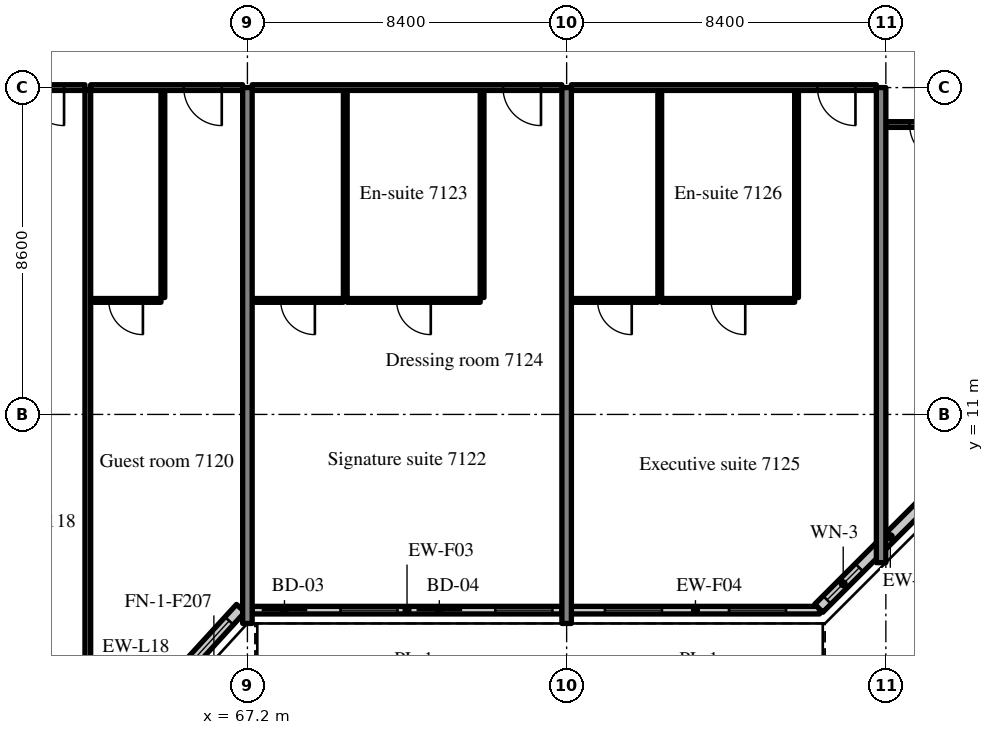
"""IFC4 building model, lengths in metres.
Left out: names, types, materials, properties, quantities, classifications, styles, units other than length and angle.
Written with IfcOpenShell. Run it as: python <this file> out.ifc"""

import sys

from ifc_helpers import new_model, si_unit, direction, frame, frame_2d, origin, place, context, subcontext, project, spatial, rectangle, extrude, source, transform, mapped, element, fill, save


model = new_model("IFC4")
c1 = context("Model", 3, precision=1e-05, world=origin(), true_north=direction((0.0, 1.0)))
c2 = subcontext(c1, "Body", "Model", "MODEL_VIEW")
j1 = project(units=[si_unit("LENGTHUNIT", "METRE"), si_unit("PLANEANGLEUNIT", "RADIAN")], contexts=[c1])
p1 = place(None, origin())
s1 = spatial("IfcSite", under=j1, at=p1, CompositionType="ELEMENT")
p2 = place(p1, origin())
s2 = spatial("IfcBuilding", under=s1, at=p2, CompositionType="ELEMENT")
p3 = place(p2, frame((0.0, 0.0, 297.7)))
s3 = spatial("IfcBuildingStorey", under=s2, at=p3, CompositionType="ELEMENT", Elevation=297.7)
m1 = source(origin(), c2, "Body", "SweptSolid", [
    extrude(rectangle(XDim=14.1, YDim=0.25, at=frame_2d((7.05, 0.0))), origin(), (0.0, 0.0, 1.0), 3.72),
])
for number, where, z_axis, x_axis in (
    (1, (67.2, 5.5, 0.0), (0.0, 0.0, 1.0), (0.0, 1.0, 0.0)),
    (2, (75.6, 5.5, 0.0), (0.0, 0.0, 1.0), (0.0, 1.0, 0.0)),
):
    element("IfcWall", number, at=place(p3, frame(where, z_axis=z_axis, x_axis=x_axis)), inside=s3, PredefinedType="SHEAR", context=c2, shape_type="MappedRepresentation", body=[
        mapped(m1, transform((0.0, 0.0, 0.0), scale=1.0)),
    ])
m2 = source(origin(), c2, "Body", "SweptSolid", [
    extrude(rectangle(XDim=12.5, YDim=0.25, at=frame_2d((6.25, 0.0))), origin(), (0.0, 0.0, 1.0), 3.72),
])
p4 = place(p3, frame((83.875, 7.1, 0.0), z_axis=(0.0, 0.0, 1.0), x_axis=(0.0, 1.0, 0.0)))
e3 = element("IfcWall", 3, at=p4, inside=s3, PredefinedType="SHEAR", context=c2, shape_type="MappedRepresentation", body=[
    mapped(m2, transform((0.0, 0.0, 0.0), scale=1.0)),
])
m3 = source(origin(), c2, "Body", "SweptSolid", [
    extrude(rectangle(XDim=2.398, YDim=0.3, at=frame_2d((1.199, 0.0))), origin(), (0.0, 0.0, 1.0), 3.72),
])
p5 = place(p3, frame((65.404, 4.131, 0.0), z_axis=(0.0, 0.0, 1.0), x_axis=(0.675374189419, 0.737475222815, 0.0)))
e4 = element("IfcWall", 4, at=p5, inside=s3, PredefinedType="SOLIDWALL", context=c2, shape_type="MappedRepresentation", body=[
    mapped(m3, transform((0.0, 0.0, 0.0), scale=1.0)),
])
m4 = source(origin(), c2, "Body", "SweptSolid", [
    extrude(rectangle(XDim=1.5, YDim=2.0, at=frame_2d((0.75, 1.0))), frame((0.0, 0.16, 0.0), z_axis=(0.0, -1.0, 0.0), x_axis=(1.0, 0.0, 0.0)), (0.0, 0.0, 1.0), 0.32),
])
p6 = place(p5, frame((0.449, 0.0, 0.9)))
e5 = element("IfcOpeningElement", 5, at=p6, cuts=e4, PredefinedType="OPENING", context=c2, shape_type="MappedRepresentation", body=[
    mapped(m4, transform((0.0, 0.0, 0.0), scale=1.0)),
])
m5 = source(origin(), c2, "Body", "SweptSolid", [
    extrude(rectangle(XDim=8.15, YDim=0.2, at=frame_2d((4.075, 0.0))), origin(), (0.0, 0.0, 1.0), 3.17),
])
p7 = place(p3, frame((67.325, 5.85, 0.0), z_axis=(0.0, 0.0, 1.0), x_axis=(1.0, 0.0, 0.0)))
e6 = element("IfcWall", 6, at=p7, inside=s3, PredefinedType="SOLIDWALL", context=c2, shape_type="MappedRepresentation", body=[
    mapped(m5, transform((0.0, 0.0, 0.0), scale=1.0)),
])
m6 = source(origin(), c2, "Body", "SweptSolid", [
    extrude(rectangle(XDim=1.2, YDim=2.4, at=frame_2d((0.6, 1.2))), frame((0.0, 0.11, 0.0), z_axis=(0.0, -1.0, 0.0), x_axis=(1.0, 0.0, 0.0)), (0.0, 0.0, 1.0), 0.22),
])
p8 = place(p7, frame((0.25, 0.0, 0.0)))
e7 = element("IfcOpeningElement", 7, at=p8, cuts=e6, PredefinedType="OPENING", context=c2, shape_type="MappedRepresentation", body=[
    mapped(m6, transform((0.0, 0.0, 0.0), scale=1.0)),
])
m7 = source(origin(), c2, "Body", "SweptSolid", [
    extrude(rectangle(XDim=1.5, YDim=1.5, at=frame_2d((0.75, 0.75))), frame((0.0, 0.11, 0.0), z_axis=(0.0, -1.0, 0.0), x_axis=(1.0, 0.0, 0.0)), (0.0, 0.0, 1.0), 0.22),
])
p9 = place(p7, frame((2.325, 0.0, 0.9)))
e8 = element("IfcOpeningElement", 8, at=p9, cuts=e6, PredefinedType="OPENING", context=c2, shape_type="MappedRepresentation", body=[
    mapped(m7, transform((0.0, 0.0, 0.0), scale=1.0)),
])
p10 = place(p7, frame((4.325, 0.0, 0.0)))
e9 = element("IfcOpeningElement", 9, at=p10, cuts=e6, PredefinedType="OPENING", context=c2, shape_type="MappedRepresentation", body=[
    mapped(m6, transform((0.0, 0.0, 0.0), scale=1.0)),
])
p11 = place(p7, frame((6.4, 0.0, 0.9)))
e10 = element("IfcOpeningElement", 10, at=p11, cuts=e6, PredefinedType="OPENING", context=c2, shape_type="MappedRepresentation", body=[
    mapped(m7, transform((0.0, 0.0, 0.0), scale=1.0)),
])
m8 = source(origin(), c2, "Body", "SweptSolid", [
    extrude(rectangle(XDim=6.53, YDim=0.2, at=frame_2d((3.265, 0.0))), origin(), (0.0, 0.0, 1.0), 3.17),
])
p12 = place(p3, frame((75.725, 5.85, 0.0), z_axis=(0.0, 0.0, 1.0), x_axis=(1.0, 0.0, 0.0)))
e11 = element("IfcWall", 11, at=p12, inside=s3, PredefinedType="SOLIDWALL", context=c2, shape_type="MappedRepresentation", body=[
    mapped(m8, transform((0.0, 0.0, 0.0), scale=1.0)),
])
p13 = place(p12, frame((0.883, 0.0, 0.9)))
e12 = element("IfcOpeningElement", 12, at=p13, cuts=e11, PredefinedType="OPENING", context=c2, shape_type="MappedRepresentation", body=[
    mapped(m7, transform((0.0, 0.0, 0.0), scale=1.0)),
])
p14 = place(p12, frame((4.147, 0.0, 0.9)))
e13 = element("IfcOpeningElement", 13, at=p14, cuts=e11, PredefinedType="OPENING", context=c2, shape_type="MappedRepresentation", body=[
    mapped(m7, transform((0.0, 0.0, 0.0), scale=1.0)),
])
m9 = source(origin(), c2, "Body", "SweptSolid", [
    extrude(rectangle(XDim=5.326, YDim=0.3, at=frame_2d((2.663, 0.0))), origin(), (0.0, 0.0, 1.0), 3.72),
])
p15 = place(p3, frame((82.234, 5.9, 0.0), z_axis=(0.0, 0.0, 1.0), x_axis=(0.707083859269, 0.707129702361, 0.0)))
e14 = element("IfcWall", 14, at=p15, inside=s3, PredefinedType="SOLIDWALL", context=c2, shape_type="MappedRepresentation", body=[
    mapped(m9, transform((0.0, 0.0, 0.0), scale=1.0)),
])
m10 = source(origin(), c2, "Body", "SweptSolid", [
    extrude(rectangle(XDim=1.2, YDim=1.5, at=frame_2d((0.6, 0.75))), frame((0.0, 0.16, 0.0), z_axis=(0.0, -1.0, 0.0), x_axis=(1.0, 0.0, 0.0)), (0.0, 0.0, 1.0), 0.32),
])
p16 = place(p15, frame((0.31, 0.0, 0.9)))
e15 = element("IfcOpeningElement", 15, at=p16, cuts=e14, PredefinedType="OPENING", context=c2, shape_type="MappedRepresentation", body=[
    mapped(m10, transform((0.0, 0.0, 0.0), scale=1.0)),
])
m11 = source(origin(), c2, "Body", "SweptSolid", [
    extrude(rectangle(XDim=4.0, YDim=0.15, at=frame_2d((2.0, 0.0))), origin(), (0.0, 0.0, 1.0), 3.02),
])
p17 = place(p3, frame((58.925, 19.6, 0.0), z_axis=(0.0, 0.0, 1.0), x_axis=(1.0, 0.0, 0.0)))
e16 = element("IfcWall", 16, at=p17, inside=s3, PredefinedType="PARTITIONING", context=c2, shape_type="MappedRepresentation", body=[
    mapped(m11, transform((0.0, 0.0, 0.0), scale=1.0)),
])
m12 = source(origin(), c2, "Body", "SweptSolid", [
    extrude(rectangle(XDim=1.0, YDim=2.1, at=frame_2d((0.5, 1.05))), frame((0.0, 0.085, 0.0), z_axis=(0.0, -1.0, 0.0), x_axis=(1.0, 0.0, 0.0)), (0.0, 0.0, 1.0), 0.17),
])
p18 = place(p17, frame((2.45, 0.0, 0.0)))
e17 = element("IfcOpeningElement", 17, at=p18, cuts=e16, PredefinedType="OPENING", context=c2, shape_type="MappedRepresentation", body=[
    mapped(m12, transform((0.0, 0.0, 0.0), scale=1.0)),
])
m13 = source(origin(), c2, "Body", "SweptSolid", [
    extrude(rectangle(XDim=5.45, YDim=0.1, at=frame_2d((2.725, 0.0))), origin(), (0.0, 0.0, 1.0), 3.72),
])
p19 = place(p3, frame((64.975, 14.075, 0.0), z_axis=(0.0, 0.0, 1.0), x_axis=(0.0, 1.0, 0.0)))
e18 = element("IfcWall", 18, at=p19, inside=s3, PredefinedType="PARTITIONING", context=c2, shape_type="MappedRepresentation", body=[
    mapped(m13, transform((0.0, 0.0, 0.0), scale=1.0)),
])
m14 = source(origin(), c2, "Body", "SweptSolid", [
    extrude(rectangle(XDim=1.85, YDim=0.1, at=frame_2d((0.925, 0.0))), origin(), (0.0, 0.0, 1.0), 3.72),
])
p20 = place(p3, frame((63.075, 14.0, 0.0), z_axis=(0.0, 0.0, 1.0), x_axis=(1.0, 0.0, 0.0)))
e19 = element("IfcWall", 19, at=p20, inside=s3, PredefinedType="PARTITIONING", context=c2, shape_type="MappedRepresentation", body=[
    mapped(m14, transform((0.0, 0.0, 0.0), scale=1.0)),
])
m15 = source(origin(), c2, "Body", "SweptSolid", [
    extrude(rectangle(XDim=0.9, YDim=2.1, at=frame_2d((0.45, 1.05))), frame((0.0, 0.06, 0.0), z_axis=(0.0, -1.0, 0.0), x_axis=(1.0, 0.0, 0.0)), (0.0, 0.0, 1.0), 0.12),
])
p21 = place(p20, frame((0.475, 0.0, 0.0)))
e20 = element("IfcOpeningElement", 20, at=p21, cuts=e19, PredefinedType="OPENING", context=c2, shape_type="MappedRepresentation", body=[
    mapped(m15, transform((0.0, 0.0, 0.0), scale=1.0)),
])
p22 = place(p3, frame((63.075, 19.6, 0.0), z_axis=(0.0, 0.0, 1.0), x_axis=(1.0, 0.0, 0.0)))
e21 = element("IfcWall", 21, at=p22, inside=s3, PredefinedType="PARTITIONING", context=c2, shape_type="MappedRepresentation", body=[
    mapped(m11, transform((0.0, 0.0, 0.0), scale=1.0)),
])
p23 = place(p22, frame((2.45, 0.0, 0.0)))
e22 = element("IfcOpeningElement", 22, at=p23, cuts=e21, PredefinedType="OPENING", context=c2, shape_type="MappedRepresentation", body=[
    mapped(m12, transform((0.0, 0.0, 0.0), scale=1.0)),
])
m16 = source(origin(), c2, "Body", "SweptSolid", [
    extrude(rectangle(XDim=15.498, YDim=0.15, at=frame_2d((7.749, 0.0))), origin(), (0.0, 0.0, 1.0), 3.72),
])
p24 = place(p3, frame((63.0, 4.027, 0.0), z_axis=(0.0, 0.0, 1.0), x_axis=(0.0, 1.0, 0.0)))
e23 = element("IfcWall", 23, at=p24, inside=s3, PredefinedType="PARTITIONING", context=c2, shape_type="MappedRepresentation", body=[
    mapped(m16, transform((0.0, 0.0, 0.0), scale=1.0)),
])
for number, where, z_axis, x_axis in (
    (24, (73.375, 14.075, 0.0), (0.0, 0.0, 1.0), (0.0, 1.0, 0.0)),
    (25, (69.775, 14.075, 0.0), (0.0, 0.0, 1.0), (0.0, 1.0, 0.0)),
):
    element("IfcWall", number, at=place(p3, frame(where, z_axis=z_axis, x_axis=x_axis)), inside=s3, PredefinedType="PARTITIONING", context=c2, shape_type="MappedRepresentation", body=[
        mapped(m13, transform((0.0, 0.0, 0.0), scale=1.0)),
    ])
m17 = source(origin(), c2, "Body", "SweptSolid", [
    extrude(rectangle(XDim=3.5, YDim=0.1, at=frame_2d((1.75, 0.0))), origin(), (0.0, 0.0, 1.0), 3.72),
])
p25 = place(p3, frame((69.825, 14.0, 0.0), z_axis=(0.0, 0.0, 1.0), x_axis=(1.0, 0.0, 0.0)))
e26 = element("IfcWall", 26, at=p25, inside=s3, PredefinedType="PARTITIONING", context=c2, shape_type="MappedRepresentation", body=[
    mapped(m17, transform((0.0, 0.0, 0.0), scale=1.0)),
])
p26 = place(p25, frame((1.3, 0.0, 0.0)))
e27 = element("IfcOpeningElement", 27, at=p26, cuts=e26, PredefinedType="OPENING", context=c2, shape_type="MappedRepresentation", body=[
    mapped(m15, transform((0.0, 0.0, 0.0), scale=1.0)),
])
m18 = source(origin(), c2, "Body", "SweptSolid", [
    extrude(rectangle(XDim=2.4, YDim=0.1, at=frame_2d((1.2, 0.0))), origin(), (0.0, 0.0, 1.0), 3.72),
])
p27 = place(p3, frame((67.325, 14.0, 0.0), z_axis=(0.0, 0.0, 1.0), x_axis=(1.0, 0.0, 0.0)))
e28 = element("IfcWall", 28, at=p27, inside=s3, PredefinedType="PARTITIONING", context=c2, shape_type="MappedRepresentation", body=[
    mapped(m18, transform((0.0, 0.0, 0.0), scale=1.0)),
])
p28 = place(p27, frame((0.75, 0.0, 0.0)))
e29 = element("IfcOpeningElement", 29, at=p28, cuts=e28, PredefinedType="OPENING", context=c2, shape_type="MappedRepresentation", body=[
    mapped(m15, transform((0.0, 0.0, 0.0), scale=1.0)),
])
m19 = source(origin(), c2, "Body", "SweptSolid", [
    extrude(rectangle(XDim=8.15, YDim=0.15, at=frame_2d((4.075, 0.0))), origin(), (0.0, 0.0, 1.0), 3.02),
])
p29 = place(p3, frame((67.325, 19.6, 0.0), z_axis=(0.0, 0.0, 1.0), x_axis=(1.0, 0.0, 0.0)))
e30 = element("IfcWall", 30, at=p29, inside=s3, PredefinedType="PARTITIONING", context=c2, shape_type="MappedRepresentation", body=[
    mapped(m19, transform((0.0, 0.0, 0.0), scale=1.0)),
])
p30 = place(p29, frame((6.6, 0.0, 0.0)))
e31 = element("IfcOpeningElement", 31, at=p30, cuts=e30, PredefinedType="OPENING", context=c2, shape_type="MappedRepresentation", body=[
    mapped(m12, transform((0.0, 0.0, 0.0), scale=1.0)),
])
for number, where, z_axis, x_axis in (
    (32, (81.65, 14.075, 0.0), (0.0, 0.0, 1.0), (0.0, 1.0, 0.0)),
    (33, (78.05, 14.075, 0.0), (0.0, 0.0, 1.0), (0.0, 1.0, 0.0)),
):
    element("IfcWall", number, at=place(p3, frame(where, z_axis=z_axis, x_axis=x_axis)), inside=s3, PredefinedType="PARTITIONING", context=c2, shape_type="MappedRepresentation", body=[
        mapped(m13, transform((0.0, 0.0, 0.0), scale=1.0)),
    ])
p31 = place(p3, frame((78.1, 14.0, 0.0), z_axis=(0.0, 0.0, 1.0), x_axis=(1.0, 0.0, 0.0)))
e34 = element("IfcWall", 34, at=p31, inside=s3, PredefinedType="PARTITIONING", context=c2, shape_type="MappedRepresentation", body=[
    mapped(m17, transform((0.0, 0.0, 0.0), scale=1.0)),
])
p32 = place(p31, frame((1.3, 0.0, 0.0)))
e35 = element("IfcOpeningElement", 35, at=p32, cuts=e34, PredefinedType="OPENING", context=c2, shape_type="MappedRepresentation", body=[
    mapped(m15, transform((0.0, 0.0, 0.0), scale=1.0)),
])
m20 = source(origin(), c2, "Body", "SweptSolid", [
    extrude(rectangle(XDim=2.275, YDim=0.1, at=frame_2d((1.137, 0.0))), origin(), (0.0, 0.0, 1.0), 3.72),
])
p33 = place(p3, frame((75.725, 14.0, 0.0), z_axis=(0.0, 0.0, 1.0), x_axis=(1.0, 0.0, 0.0)))
e36 = element("IfcWall", 36, at=p33, inside=s3, PredefinedType="PARTITIONING", context=c2, shape_type="MappedRepresentation", body=[
    mapped(m20, transform((0.0, 0.0, 0.0), scale=1.0)),
])
p34 = place(p33, frame((0.688, 0.0, 0.0)))
e37 = element("IfcOpeningElement", 37, at=p34, cuts=e36, PredefinedType="OPENING", context=c2, shape_type="MappedRepresentation", body=[
    mapped(m15, transform((0.0, 0.0, 0.0), scale=1.0)),
])
m21 = source(origin(), c2, "Body", "SweptSolid", [
    extrude(rectangle(XDim=8.025, YDim=0.15, at=frame_2d((4.012, 0.0))), origin(), (0.0, 0.0, 1.0), 3.02),
])
p35 = place(p3, frame((75.725, 19.6, 0.0), z_axis=(0.0, 0.0, 1.0), x_axis=(1.0, 0.0, 0.0)))
e38 = element("IfcWall", 38, at=p35, inside=s3, PredefinedType="PARTITIONING", context=c2, shape_type="MappedRepresentation", body=[
    mapped(m21, transform((0.0, 0.0, 0.0), scale=1.0)),
])
p36 = place(p35, frame((6.475, 0.0, 0.0)))
e39 = element("IfcOpeningElement", 39, at=p36, cuts=e38, PredefinedType="OPENING", context=c2, shape_type="MappedRepresentation", body=[
    mapped(m12, transform((0.0, 0.0, 0.0), scale=1.0)),
])
m22 = source(origin(), c2, "Body", "SweptSolid", [
    extrude(rectangle(XDim=1.9, YDim=0.15, at=frame_2d((0.95, 0.0))), origin(), (0.0, 0.0, 1.0), 3.02),
])
p37 = place(p3, frame((84.0, 18.628, 0.0), z_axis=(0.0, 0.0, 1.0), x_axis=(1.0, 0.0, 0.0)))
e40 = element("IfcWall", 40, at=p37, inside=s3, PredefinedType="PARTITIONING", context=c2, shape_type="MappedRepresentation", body=[
    mapped(m22, transform((0.0, 0.0, 0.0), scale=1.0)),
])
p38 = place(p37, frame((0.625, 0.0, 0.0)))
e41 = element("IfcOpeningElement", 41, at=p38, cuts=e40, PredefinedType="OPENING", context=c2, shape_type="MappedRepresentation", body=[
    mapped(m12, transform((0.0, 0.0, 0.0), scale=1.0)),
])
m23 = source(origin(), c2, "Body", "SweptSolid", [
    extrude(rectangle(XDim=1.5, YDim=2.0, at=frame_2d((0.75, 1.0))), frame((0.0, 0.03, 0.0), z_axis=(0.0, -1.0, 0.0), x_axis=(1.0, 0.0, 0.0)), (0.0, 0.0, 1.0), 0.06),
])
p39 = place(p6, origin())
e42 = element("IfcWindow", 42, at=p39, inside=s3, PartitioningType="SINGLE_PANEL", PredefinedType="WINDOW", context=c2, shape_type="MappedRepresentation", body=[
    mapped(m23, transform((0.0, 0.0, 0.0), scale=1.0)),
])
fill(e5, e42)
m24 = source(origin(), c2, "Body", "SweptSolid", [
    extrude(rectangle(XDim=1.2, YDim=2.4, at=frame_2d((0.6, 1.2))), frame((0.0, 0.025, 0.0), z_axis=(0.0, -1.0, 0.0), x_axis=(1.0, 0.0, 0.0)), (0.0, 0.0, 1.0), 0.05),
])
p40 = place(p8, origin())
e43 = element("IfcDoor", 43, at=p40, inside=s3, OperationType="SLIDING_TO_LEFT", PredefinedType="DOOR", context=c2, shape_type="MappedRepresentation", body=[
    mapped(m24, transform((0.0, 0.0, 0.0), scale=1.0)),
])
fill(e7, e43)
m25 = source(origin(), c2, "Body", "SweptSolid", [
    extrude(rectangle(XDim=1.5, YDim=1.5, at=frame_2d((0.75, 0.75))), frame((0.0, 0.03, 0.0), z_axis=(0.0, -1.0, 0.0), x_axis=(1.0, 0.0, 0.0)), (0.0, 0.0, 1.0), 0.06),
])
p41 = place(p9, origin())
e44 = element("IfcWindow", 44, at=p41, inside=s3, PartitioningType="SINGLE_PANEL", PredefinedType="WINDOW", context=c2, shape_type="MappedRepresentation", body=[
    mapped(m25, transform((0.0, 0.0, 0.0), scale=1.0)),
])
fill(e8, e44)
p42 = place(p10, origin())
e45 = element("IfcDoor", 45, at=p42, inside=s3, OperationType="SLIDING_TO_RIGHT", PredefinedType="DOOR", context=c2, shape_type="MappedRepresentation", body=[
    mapped(m24, transform((0.0, 0.0, 0.0), scale=1.0)),
])
fill(e9, e45)
p43 = place(p11, origin())
e46 = element("IfcWindow", 46, at=p43, inside=s3, PartitioningType="SINGLE_PANEL", PredefinedType="WINDOW", context=c2, shape_type="MappedRepresentation", body=[
    mapped(m25, transform((0.0, 0.0, 0.0), scale=1.0)),
])
fill(e10, e46)
p44 = place(p13, origin())
e47 = element("IfcWindow", 47, at=p44, inside=s3, PartitioningType="SINGLE_PANEL", PredefinedType="WINDOW", context=c2, shape_type="MappedRepresentation", body=[
    mapped(m25, transform((0.0, 0.0, 0.0), scale=1.0)),
])
fill(e12, e47)
p45 = place(p14, origin())
e48 = element("IfcWindow", 48, at=p45, inside=s3, PartitioningType="SINGLE_PANEL", PredefinedType="WINDOW", context=c2, shape_type="MappedRepresentation", body=[
    mapped(m25, transform((0.0, 0.0, 0.0), scale=1.0)),
])
fill(e13, e48)
m26 = source(origin(), c2, "Body", "SweptSolid", [
    extrude(rectangle(XDim=1.2, YDim=1.5, at=frame_2d((0.6, 0.75))), frame((0.0, 0.03, 0.0), z_axis=(0.0, -1.0, 0.0), x_axis=(1.0, 0.0, 0.0)), (0.0, 0.0, 1.0), 0.06),
])
p46 = place(p16, origin())
e49 = element("IfcWindow", 49, at=p46, inside=s3, PartitioningType="SINGLE_PANEL", PredefinedType="WINDOW", context=c2, shape_type="MappedRepresentation", body=[
    mapped(m26, transform((0.0, 0.0, 0.0), scale=1.0)),
])
fill(e15, e49)
m27 = source(origin(), c2, "Body", "SweptSolid", [
    extrude(rectangle(XDim=1.0, YDim=2.1, at=frame_2d((0.5, 1.05))), frame((0.0, 0.025, 0.0), z_axis=(0.0, -1.0, 0.0), x_axis=(1.0, 0.0, 0.0)), (0.0, 0.0, 1.0), 0.05),
])
p47 = place(p18, origin())
e50 = element("IfcDoor", 50, at=p47, inside=s3, OperationType="SINGLE_SWING_RIGHT", PredefinedType="DOOR", context=c2, shape_type="MappedRepresentation", body=[
    mapped(m27, transform((0.0, 0.0, 0.0), scale=1.0)),
])
fill(e17, e50)
m28 = source(origin(), c2, "Body", "SweptSolid", [
    extrude(rectangle(XDim=0.9, YDim=2.1, at=frame_2d((0.45, 1.05))), frame((0.0, 0.025, 0.0), z_axis=(0.0, -1.0, 0.0), x_axis=(1.0, 0.0, 0.0)), (0.0, 0.0, 1.0), 0.05),
])
p48 = place(p21, origin())
e51 = element("IfcDoor", 51, at=p48, inside=s3, OperationType="SINGLE_SWING_RIGHT", PredefinedType="DOOR", context=c2, shape_type="MappedRepresentation", body=[
    mapped(m28, transform((0.0, 0.0, 0.0), scale=1.0)),
])
fill(e20, e51)
p49 = place(p23, origin())
e52 = element("IfcDoor", 52, at=p49, inside=s3, OperationType="SINGLE_SWING_RIGHT", PredefinedType="DOOR", context=c2, shape_type="MappedRepresentation", body=[
    mapped(m27, transform((0.0, 0.0, 0.0), scale=1.0)),
])
fill(e22, e52)
p50 = place(p26, origin())
e53 = element("IfcDoor", 53, at=p50, inside=s3, OperationType="SINGLE_SWING_RIGHT", PredefinedType="DOOR", context=c2, shape_type="MappedRepresentation", body=[
    mapped(m28, transform((0.0, 0.0, 0.0), scale=1.0)),
])
fill(e27, e53)
p51 = place(p28, origin())
e54 = element("IfcDoor", 54, at=p51, inside=s3, OperationType="SINGLE_SWING_RIGHT", PredefinedType="DOOR", context=c2, shape_type="MappedRepresentation", body=[
    mapped(m28, transform((0.0, 0.0, 0.0), scale=1.0)),
])
fill(e29, e54)
p52 = place(p30, origin())
e55 = element("IfcDoor", 55, at=p52, inside=s3, OperationType="SINGLE_SWING_RIGHT", PredefinedType="DOOR", context=c2, shape_type="MappedRepresentation", body=[
    mapped(m27, transform((0.0, 0.0, 0.0), scale=1.0)),
])
fill(e31, e55)
p53 = place(p32, origin())
e56 = element("IfcDoor", 56, at=p53, inside=s3, OperationType="SINGLE_SWING_RIGHT", PredefinedType="DOOR", context=c2, shape_type="MappedRepresentation", body=[
    mapped(m28, transform((0.0, 0.0, 0.0), scale=1.0)),
])
fill(e35, e56)
p54 = place(p34, origin())
e57 = element("IfcDoor", 57, at=p54, inside=s3, OperationType="SINGLE_SWING_RIGHT", PredefinedType="DOOR", context=c2, shape_type="MappedRepresentation", body=[
    mapped(m28, transform((0.0, 0.0, 0.0), scale=1.0)),
])
fill(e37, e57)
p55 = place(p36, origin())
e58 = element("IfcDoor", 58, at=p55, inside=s3, OperationType="SINGLE_SWING_RIGHT", PredefinedType="DOOR", context=c2, shape_type="MappedRepresentation", body=[
    mapped(m27, transform((0.0, 0.0, 0.0), scale=1.0)),
])
fill(e39, e58)
p56 = place(p38, origin())
e59 = element("IfcDoor", 59, at=p56, inside=s3, OperationType="SINGLE_SWING_RIGHT", PredefinedType="DOOR", context=c2, shape_type="MappedRepresentation", body=[
    mapped(m27, transform((0.0, 0.0, 0.0), scale=1.0)),
])
fill(e41, e59)
save(model, sys.argv[1])
